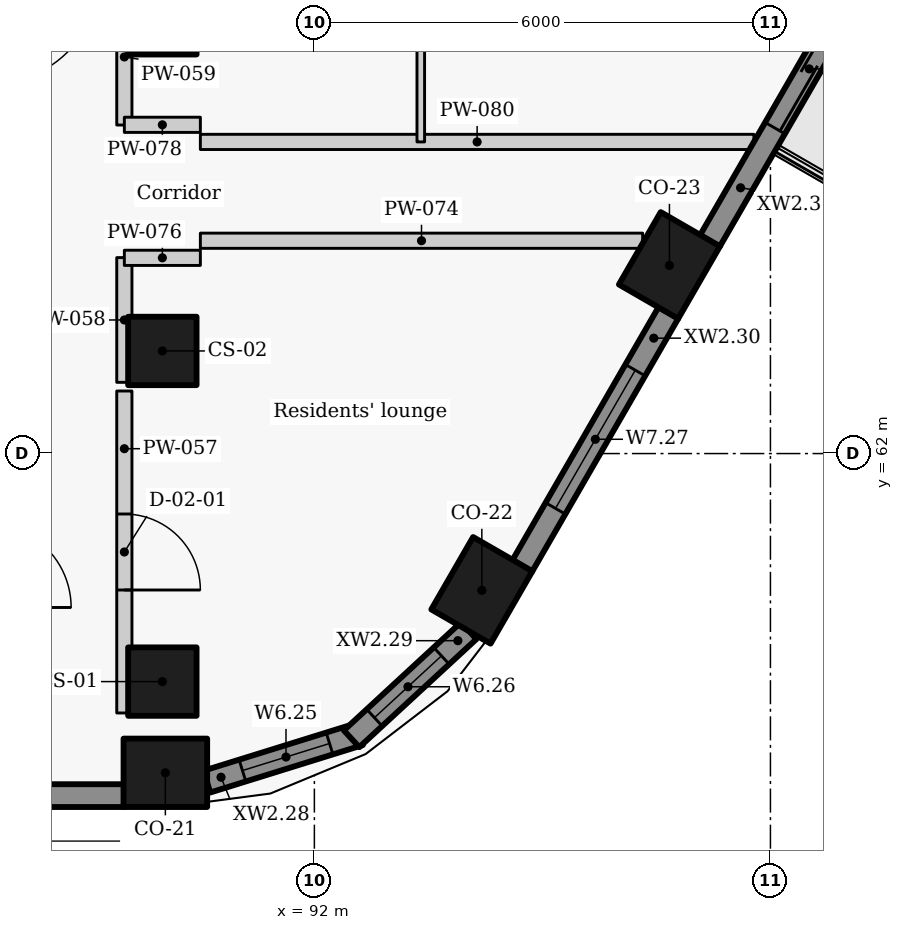
"""IFC4 building model, lengths in metres.
Left out: names, types, materials, properties, quantities, classifications, styles, units other than length and angle.
Written with IfcOpenShell. Run it as: python <this file> out.ifc"""

import sys

from ifc_helpers import new_model, si_unit, direction, frame, frame_2d, origin, origin_2d, place, context, subcontext, project, spatial, rectangle, extrude, element, fill, save


model = new_model("IFC4")
c1 = context("Model", 3, precision=1e-05, world=origin(), true_north=direction((0.0, 1.0)))
c2 = subcontext(c1, "Body", "Model", "MODEL_VIEW")
j1 = project(units=[si_unit("LENGTHUNIT", "METRE"), si_unit("PLANEANGLEUNIT", "RADIAN")], contexts=[c1])
p1 = place(None, origin())
s1 = spatial("IfcSite", under=j1, at=p1, CompositionType="ELEMENT")
p2 = place(p1, origin())
s2 = spatial("IfcBuilding", under=s1, at=p2, CompositionType="ELEMENT")
p3 = place(p2, frame((0.0, 0.0, 229.5)))
s3 = spatial("IfcBuildingStorey", under=s2, at=p3, CompositionType="ELEMENT", Elevation=229.5)
for number, where, z_axis, x_axis in (
    (1, (90.04, 57.8, 0.0), (0.0, 0.0, 1.0), (1.0, 0.0, 0.0)),
    (2, (94.203, 60.2, 0.0), (0.0, 0.0, 1.0), (0.5, 0.866, 0.0)),
    (3, (96.671, 64.475, 0.0), (0.0, 0.0, 1.0), (0.5, 0.866, 0.0)),
):
    element("IfcColumn", number, at=place(p3, frame(where, z_axis=z_axis, x_axis=x_axis)), inside=s3, PredefinedType="COLUMN", context=c2, shape_type="SweptSolid", body=[
        extrude(rectangle(XDim=1.1, YDim=0.9, at=origin_2d()), origin(), (0.0, 0.0, 1.0), 3.3),
    ])
for number, where, z_axis, x_axis in (
    (4, (90.0, 59.0, 0.0), (0.0, 0.0, 1.0), (0.0, 1.0, 0.0)),
    (5, (90.0, 63.35, 0.0), (0.0, 0.0, 1.0), (0.0, 1.0, 0.0)),
    (6, (90.0, 67.7, 0.0), (0.0, 0.0, 1.0), (0.0, 1.0, 0.0)),
):
    element("IfcColumn", number, at=place(p3, frame(where, z_axis=z_axis, x_axis=x_axis)), inside=s3, PredefinedType="COLUMN", context=c2, shape_type="SweptSolid", body=[
        extrude(rectangle(XDim=0.9, YDim=0.9, at=origin_2d()), origin(), (0.0, 0.0, 1.0), 3.3),
    ])
p4 = place(p3, frame((70.501, 57.5, 0.0), z_axis=(0.0, 0.0, 1.0), x_axis=(1.0, 0.0, 0.0)))
e7 = element("IfcWall", 7, at=p4, inside=s3, PredefinedType="SOLIDWALL", context=c2, shape_type="SweptSolid", body=[
    extrude(rectangle(XDim=18.993, YDim=0.3, at=frame_2d((9.496, 0.0))), origin(), (0.0, 0.0, 1.0), 2.425),
])
p5 = place(p3, frame((90.586, 57.684, 0.0), z_axis=(0.0, 0.0, 1.0), x_axis=(0.954941641926, 0.296793632875, 0.0)))
e8 = element("IfcWall", 8, at=p5, inside=s3, PredefinedType="SOLIDWALL", context=c2, shape_type="SweptSolid", body=[
    extrude(rectangle(XDim=2.103, YDim=0.3, at=frame_2d((1.051, 0.0))), origin(), (0.0, 0.0, 1.0), 2.425),
])
p6 = place(p5, frame((0.49, 0.0, 0.9)))
e9 = element("IfcOpeningElement", 9, at=p6, cuts=e8, PredefinedType="OPENING", context=c2, shape_type="SweptSolid", body=[
    extrude(rectangle(XDim=1.2, YDim=1.1, at=frame_2d((0.6, 0.55))), frame((0.0, 0.16, 0.0), z_axis=(0.0, -1.0, 0.0), x_axis=(1.0, 0.0, 0.0)), (0.0, 0.0, 1.0), 0.32),
])
p7 = place(p3, frame((92.49, 58.247, 0.0), z_axis=(0.0, 0.0, 1.0), x_axis=(0.734830223907, 0.678251090698, 0.0)))
e10 = element("IfcWall", 10, at=p7, inside=s3, PredefinedType="SOLIDWALL", context=c2, shape_type="SweptSolid", body=[
    extrude(rectangle(XDim=2.097, YDim=0.3, at=frame_2d((1.049, 0.0))), origin(), (0.0, 0.0, 1.0), 2.425),
])
p8 = place(p7, frame((0.409, 0.0, 0.9)))
e11 = element("IfcOpeningElement", 11, at=p8, cuts=e10, PredefinedType="OPENING", context=c2, shape_type="SweptSolid", body=[
    extrude(rectangle(XDim=1.2, YDim=1.1, at=frame_2d((0.6, 0.55))), frame((0.0, 0.16, 0.0), z_axis=(0.0, -1.0, 0.0), x_axis=(1.0, 0.0, 0.0)), (0.0, 0.0, 1.0), 0.32),
])
p9 = place(p3, frame((94.736, 60.523, 0.0), z_axis=(0.0, 0.0, 1.0), x_axis=(0.499984490703, 0.866034357896, 0.0)))
e12 = element("IfcWall", 12, at=p9, inside=s3, PredefinedType="SOLIDWALL", context=c2, shape_type="SweptSolid", body=[
    extrude(rectangle(XDim=3.844, YDim=0.3, at=frame_2d((1.922, 0.0))), origin(), (0.0, 0.0, 1.0), 2.425),
])
p10 = place(p9, frame((0.872, 0.0, 0.9)))
e13 = element("IfcOpeningElement", 13, at=p10, cuts=e12, PredefinedType="OPENING", context=c2, shape_type="SweptSolid", body=[
    extrude(rectangle(XDim=2.1, YDim=1.1, at=frame_2d((1.05, 0.55))), frame((0.0, 0.16, 0.0), z_axis=(0.0, -1.0, 0.0), x_axis=(1.0, 0.0, 0.0)), (0.0, 0.0, 1.0), 0.32),
])
p11 = place(p3, frame((97.204, 64.798, 0.0), z_axis=(0.0, 0.0, 1.0), x_axis=(0.499984490703, 0.866034357896, 0.0)))
e14 = element("IfcWall", 14, at=p11, inside=s3, PredefinedType="SOLIDWALL", context=c2, shape_type="SweptSolid", body=[
    extrude(rectangle(XDim=3.844, YDim=0.3, at=frame_2d((1.922, 0.0))), origin(), (0.0, 0.0, 1.0), 2.425),
])
p12 = place(p11, frame((1.713, 0.0, 0.0)))
e15 = element("IfcOpeningElement", 15, at=p12, cuts=e14, PredefinedType="OPENING", context=c2, shape_type="SweptSolid", body=[
    extrude(rectangle(XDim=1.8, YDim=2.0, at=frame_2d((0.9, 1.0))), frame((0.0, 0.16, 0.0), z_axis=(0.0, -1.0, 0.0), x_axis=(1.0, 0.0, 0.0)), (0.0, 0.0, 1.0), 0.32),
])
p13 = place(p3, frame((89.5, 62.823, 0.0), z_axis=(0.0, 0.0, 1.0), x_axis=(0.0, -1.0, 0.0)))
e16 = element("IfcWall", 16, at=p13, inside=s3, PredefinedType="PARTITIONING", context=c2, shape_type="SweptSolid", body=[
    extrude(rectangle(XDim=4.236, YDim=0.2, at=frame_2d((2.118, 0.0))), origin(), (0.0, 0.0, 1.0), 3.025),
])
p14 = place(p13, frame((1.618, 0.0, 0.0)))
e17 = element("IfcOpeningElement", 17, at=p14, cuts=e16, PredefinedType="OPENING", context=c2, shape_type="SweptSolid", body=[
    extrude(rectangle(XDim=1.0, YDim=2.1, at=frame_2d((0.5, 1.05))), frame((0.0, 0.11, 0.0), z_axis=(0.0, -1.0, 0.0), x_axis=(1.0, 0.0, 0.0)), (0.0, 0.0, 1.0), 0.22),
])
p15 = place(p3, frame((89.5, 62.937, 0.0), z_axis=(0.0, 0.0, 1.0), x_axis=(0.0, 1.0, 0.0)))
e18 = element("IfcWall", 18, at=p15, inside=s3, PredefinedType="PARTITIONING", context=c2, shape_type="SweptSolid", body=[
    extrude(rectangle(XDim=1.641, YDim=0.2, at=frame_2d((0.82, 0.0))), origin(), (0.0, 0.0, 1.0), 3.025),
])
p16 = place(p3, frame((89.5, 66.322, 0.0), z_axis=(0.0, 0.0, 1.0), x_axis=(0.0, 1.0, 0.0)))
e19 = element("IfcWall", 19, at=p16, inside=s3, PredefinedType="PARTITIONING", context=c2, shape_type="SweptSolid", body=[
    extrude(rectangle(XDim=1.791, YDim=0.2, at=frame_2d((0.896, 0.0))), origin(), (0.0, 0.0, 1.0), 3.025),
])
p17 = place(p3, frame((90.5, 64.8, 0.0), z_axis=(0.0, 0.0, 1.0), x_axis=(1.0, 0.0, 0.0)))
e20 = element("IfcWall", 20, at=p17, inside=s3, PredefinedType="PARTITIONING", context=c2, shape_type="SweptSolid", body=[
    extrude(rectangle(XDim=5.819, YDim=0.2, at=frame_2d((2.909, 0.0))), origin(), (0.0, 0.0, 1.0), 3.025),
])
for number, where, z_axis, x_axis in (
    (21, (89.5, 64.575, 0.0), (0.0, 0.0, 1.0), (1.0, 0.0, 0.0)),
    (22, (89.5, 66.325, 0.0), (0.0, 0.0, 1.0), (1.0, 0.0, 0.0)),
):
    element("IfcWall", number, at=place(p3, frame(where, z_axis=z_axis, x_axis=x_axis)), inside=s3, PredefinedType="PARTITIONING", context=c2, shape_type="SweptSolid", body=[
        extrude(rectangle(XDim=1.0, YDim=0.2, at=frame_2d((0.5, 0.0))), origin(), (0.0, 0.0, 1.0), 2.505),
    ])
p18 = place(p3, frame((90.5, 66.1, 0.0), z_axis=(0.0, 0.0, 1.0), x_axis=(1.0, 0.0, 0.0)))
e23 = element("IfcWall", 23, at=p18, inside=s3, PredefinedType="PARTITIONING", context=c2, shape_type="SweptSolid", body=[
    extrude(rectangle(XDim=7.282, YDim=0.2, at=frame_2d((3.641, 0.0))), origin(), (0.0, 0.0, 1.0), 2.405),
])
p19 = place(p3, frame((93.4, 92.85, 0.0), z_axis=(0.0, 0.0, 1.0), x_axis=(0.0, -1.0, 0.0)))
e24 = element("IfcWall", 24, at=p19, inside=s3, PredefinedType="PARTITIONING", context=c2, shape_type="SweptSolid", body=[
    extrude(rectangle(XDim=26.75, YDim=0.1, at=frame_2d((13.375, 0.0))), origin(), (0.0, 0.0, 1.0), 3.025),
])
p20 = place(p19, frame((23.927, 0.0, 0.0)))
e25 = element("IfcOpeningElement", 25, at=p20, cuts=e24, PredefinedType="OPENING", context=c2, shape_type="SweptSolid", body=[
    extrude(rectangle(XDim=0.9, YDim=2.1, at=frame_2d((0.45, 1.05))), frame((0.0, 0.06, 0.0), z_axis=(0.0, -1.0, 0.0), x_axis=(1.0, 0.0, 0.0)), (0.0, 0.0, 1.0), 0.12),
])
p21 = place(p19, frame((20.028, 0.0, 0.0)))
e26 = element("IfcOpeningElement", 26, at=p21, cuts=e24, PredefinedType="OPENING", context=c2, shape_type="SweptSolid", body=[
    extrude(rectangle(XDim=0.9, YDim=2.1, at=frame_2d((0.45, 1.05))), frame((0.0, 0.06, 0.0), z_axis=(0.0, -1.0, 0.0), x_axis=(1.0, 0.0, 0.0)), (0.0, 0.0, 1.0), 0.12),
])
p22 = place(p19, frame((16.977, 0.0, 0.0)))
e27 = element("IfcOpeningElement", 27, at=p22, cuts=e24, PredefinedType="OPENING", context=c2, shape_type="SweptSolid", body=[
    extrude(rectangle(XDim=0.9, YDim=2.1, at=frame_2d((0.45, 1.05))), frame((0.0, 0.06, 0.0), z_axis=(0.0, -1.0, 0.0), x_axis=(1.0, 0.0, 0.0)), (0.0, 0.0, 1.0), 0.12),
])
p23 = place(p19, frame((13.926, 0.0, 0.0)))
e28 = element("IfcOpeningElement", 28, at=p23, cuts=e24, PredefinedType="OPENING", context=c2, shape_type="SweptSolid", body=[
    extrude(rectangle(XDim=0.9, YDim=2.1, at=frame_2d((0.45, 1.05))), frame((0.0, 0.06, 0.0), z_axis=(0.0, -1.0, 0.0), x_axis=(1.0, 0.0, 0.0)), (0.0, 0.0, 1.0), 0.12),
])
p24 = place(p19, frame((10.206, 0.0, 0.0)))
e29 = element("IfcOpeningElement", 29, at=p24, cuts=e24, PredefinedType="OPENING", context=c2, shape_type="SweptSolid", body=[
    extrude(rectangle(XDim=0.9, YDim=2.1, at=frame_2d((0.45, 1.05))), frame((0.0, 0.06, 0.0), z_axis=(0.0, -1.0, 0.0), x_axis=(1.0, 0.0, 0.0)), (0.0, 0.0, 1.0), 0.12),
])
p25 = place(p19, frame((6.602, 0.0, 0.0)))
e30 = element("IfcOpeningElement", 30, at=p25, cuts=e24, PredefinedType="OPENING", context=c2, shape_type="SweptSolid", body=[
    extrude(rectangle(XDim=0.9, YDim=2.1, at=frame_2d((0.45, 1.05))), frame((0.0, 0.06, 0.0), z_axis=(0.0, -1.0, 0.0), x_axis=(1.0, 0.0, 0.0)), (0.0, 0.0, 1.0), 0.12),
])
p26 = place(p19, frame((3.781, 0.0, 0.0)))
e31 = element("IfcOpeningElement", 31, at=p26, cuts=e24, PredefinedType="OPENING", context=c2, shape_type="SweptSolid", body=[
    extrude(rectangle(XDim=0.9, YDim=2.1, at=frame_2d((0.45, 1.05))), frame((0.0, 0.06, 0.0), z_axis=(0.0, -1.0, 0.0), x_axis=(1.0, 0.0, 0.0)), (0.0, 0.0, 1.0), 0.12),
])
p27 = place(p19, frame((0.96, 0.0, 0.0)))
e32 = element("IfcOpeningElement", 32, at=p27, cuts=e24, PredefinedType="OPENING", context=c2, shape_type="SweptSolid", body=[
    extrude(rectangle(XDim=0.9, YDim=2.1, at=frame_2d((0.45, 1.05))), frame((0.0, 0.06, 0.0), z_axis=(0.0, -1.0, 0.0), x_axis=(1.0, 0.0, 0.0)), (0.0, 0.0, 1.0), 0.12),
])
p28 = place(p6, origin())
e33 = element("IfcWindow", 33, at=p28, inside=s3, PartitioningType="SINGLE_PANEL", PredefinedType="WINDOW", context=c2, shape_type="SweptSolid", body=[
    extrude(rectangle(XDim=1.2, YDim=1.1, at=frame_2d((0.6, 0.55))), frame((0.0, 0.03, 0.0), z_axis=(0.0, -1.0, 0.0), x_axis=(1.0, 0.0, 0.0)), (0.0, 0.0, 1.0), 0.06),
])
fill(e9, e33)
p29 = place(p8, origin())
e34 = element("IfcWindow", 34, at=p29, inside=s3, PartitioningType="SINGLE_PANEL", PredefinedType="WINDOW", context=c2, shape_type="SweptSolid", body=[
    extrude(rectangle(XDim=1.2, YDim=1.1, at=frame_2d((0.6, 0.55))), frame((0.0, 0.03, 0.0), z_axis=(0.0, -1.0, 0.0), x_axis=(1.0, 0.0, 0.0)), (0.0, 0.0, 1.0), 0.06),
])
fill(e11, e34)
p30 = place(p10, origin())
e35 = element("IfcWindow", 35, at=p30, inside=s3, PartitioningType="SINGLE_PANEL", PredefinedType="WINDOW", context=c2, shape_type="SweptSolid", body=[
    extrude(rectangle(XDim=2.1, YDim=1.1, at=frame_2d((1.05, 0.55))), frame((0.0, 0.03, 0.0), z_axis=(0.0, -1.0, 0.0), x_axis=(1.0, 0.0, 0.0)), (0.0, 0.0, 1.0), 0.06),
])
fill(e13, e35)
p31 = place(p12, origin())
e36 = element("IfcDoor", 36, at=p31, inside=s3, OperationType="SLIDING_TO_LEFT", PredefinedType="DOOR", context=c2, shape_type="SweptSolid", body=[
    extrude(rectangle(XDim=1.8, YDim=2.0, at=frame_2d((0.9, 1.0))), frame((0.0, 0.025, 0.0), z_axis=(0.0, -1.0, 0.0), x_axis=(1.0, 0.0, 0.0)), (0.0, 0.0, 1.0), 0.05),
])
fill(e15, e36)
p32 = place(p14, origin())
e37 = element("IfcDoor", 37, at=p32, inside=s3, OperationType="SINGLE_SWING_RIGHT", PredefinedType="DOOR", context=c2, shape_type="SweptSolid", body=[
    extrude(rectangle(XDim=1.0, YDim=2.1, at=frame_2d((0.5, 1.05))), frame((0.0, 0.025, 0.0), z_axis=(0.0, -1.0, 0.0), x_axis=(1.0, 0.0, 0.0)), (0.0, 0.0, 1.0), 0.05),
])
fill(e17, e37)
save(model, sys.argv[1])
